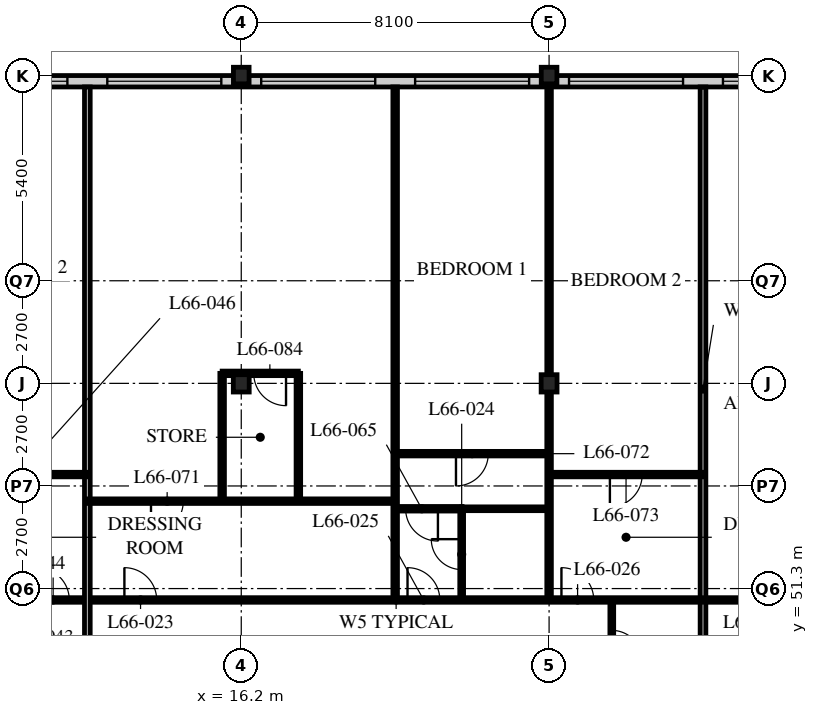
"""IFC4 building model, lengths in metres.
Left out: names, types, materials, properties, quantities, classifications, styles, units other than length and angle.
Written with IfcOpenShell. Run it as: python <this file> out.ifc"""

import sys

from ifc_helpers import new_model, si_unit, direction, frame, frame_2d, origin, origin_2d, place, context, subcontext, project, spatial, rectangle, i_section, extrude, element, fill, save


model = new_model("IFC4")
c1 = context("Model", 3, precision=1e-05, world=origin(), true_north=direction((0.0, 1.0)))
c2 = subcontext(c1, "Body", "Model", "MODEL_VIEW")
j1 = project(units=[si_unit("LENGTHUNIT", "METRE"), si_unit("PLANEANGLEUNIT", "RADIAN")], contexts=[c1])
p1 = place(None, origin())
s1 = spatial("IfcSite", under=j1, at=p1, CompositionType="ELEMENT")
p2 = place(p1, origin())
s2 = spatial("IfcBuilding", under=s1, at=p2, CompositionType="ELEMENT")
p3 = place(p2, frame((0.0, 0.0, 258.0)))
s3 = spatial("IfcBuildingStorey", under=s2, at=p3, CompositionType="ELEMENT", Elevation=258.0)
p4 = place(p3, frame((16.2, 56.7, 0.0), z_axis=(0.0, 0.0, 1.0), x_axis=(1.0, 0.0, 0.0)))
e1 = element("IfcColumn", 1, at=p4, inside=s3, PredefinedType="COLUMN", context=c2, shape_type="SweptSolid", body=[
    extrude(i_section(OverallWidth=0.418, OverallDepth=0.456, WebThickness=0.042, FlangeThickness=0.067, FilletRadius=0.015, at=origin_2d()), origin(), (0.0, 0.0, 1.0), 3.9),
])
p5 = place(p3, frame((16.2, 64.8, 0.0), z_axis=(0.0, 0.0, 1.0), x_axis=(1.0, 0.0, 0.0)))
e2 = element("IfcColumn", 2, at=p5, inside=s3, PredefinedType="COLUMN", context=c2, shape_type="SweptSolid", body=[
    extrude(i_section(OverallWidth=0.412, OverallDepth=0.437, WebThickness=0.036, FlangeThickness=0.058, FilletRadius=0.015, at=origin_2d()), origin(), (0.0, 0.0, 1.0), 3.9),
])
p6 = place(p3, frame((24.3, 56.7, 0.0), z_axis=(0.0, 0.0, 1.0), x_axis=(1.0, 0.0, 0.0)))
e3 = element("IfcColumn", 3, at=p6, inside=s3, PredefinedType="COLUMN", context=c2, shape_type="SweptSolid", body=[
    extrude(i_section(OverallWidth=0.418, OverallDepth=0.456, WebThickness=0.042, FlangeThickness=0.067, FilletRadius=0.015, at=origin_2d()), origin(), (0.0, 0.0, 1.0), 3.9),
])
p7 = place(p3, frame((24.3, 64.8, 0.0), z_axis=(0.0, 0.0, 1.0), x_axis=(1.0, 0.0, 0.0)))
e4 = element("IfcColumn", 4, at=p7, inside=s3, PredefinedType="COLUMN", context=c2, shape_type="SweptSolid", body=[
    extrude(i_section(OverallWidth=0.412, OverallDepth=0.437, WebThickness=0.036, FlangeThickness=0.058, FilletRadius=0.015, at=origin_2d()), origin(), (0.0, 0.0, 1.0), 3.9),
])
p8 = place(p3, frame((48.3, 64.65, 0.0), z_axis=(0.0, 0.0, 1.0), x_axis=(-1.0, 0.0, 0.0)))
e5 = element("IfcWall", 5, at=p8, inside=s3, PredefinedType="SOLIDWALL", context=c2, shape_type="SweptSolid", body=[
    extrude(rectangle(XDim=40.2, YDim=0.3, at=frame_2d((20.1, 0.0))), origin(), (0.0, 0.0, 1.0), 3.69),
])
p9 = place(p8, frame((0.225, 0.0, 0.6)))
e6 = element("IfcOpeningElement", 6, at=p9, cuts=e5, PredefinedType="OPENING", context=c2, shape_type="SweptSolid", body=[
    extrude(rectangle(XDim=3.0, YDim=2.4, at=frame_2d((1.5, 1.2))), frame((0.0, 0.16, 0.0), z_axis=(0.0, -1.0, 0.0), x_axis=(1.0, 0.0, 0.0)), (0.0, 0.0, 1.0), 0.32),
])
p10 = place(p8, frame((4.275, 0.0, 0.6)))
e7 = element("IfcOpeningElement", 7, at=p10, cuts=e5, PredefinedType="OPENING", context=c2, shape_type="SweptSolid", body=[
    extrude(rectangle(XDim=3.0, YDim=2.4, at=frame_2d((1.5, 1.2))), frame((0.0, 0.16, 0.0), z_axis=(0.0, -1.0, 0.0), x_axis=(1.0, 0.0, 0.0)), (0.0, 0.0, 1.0), 0.32),
])
p11 = place(p8, frame((8.325, 0.0, 0.6)))
e8 = element("IfcOpeningElement", 8, at=p11, cuts=e5, PredefinedType="OPENING", context=c2, shape_type="SweptSolid", body=[
    extrude(rectangle(XDim=3.0, YDim=2.4, at=frame_2d((1.5, 1.2))), frame((0.0, 0.16, 0.0), z_axis=(0.0, -1.0, 0.0), x_axis=(1.0, 0.0, 0.0)), (0.0, 0.0, 1.0), 0.32),
])
p12 = place(p8, frame((12.375, 0.0, 0.6)))
e9 = element("IfcOpeningElement", 9, at=p12, cuts=e5, PredefinedType="OPENING", context=c2, shape_type="SweptSolid", body=[
    extrude(rectangle(XDim=3.0, YDim=2.4, at=frame_2d((1.5, 1.2))), frame((0.0, 0.16, 0.0), z_axis=(0.0, -1.0, 0.0), x_axis=(1.0, 0.0, 0.0)), (0.0, 0.0, 1.0), 0.32),
])
p13 = place(p8, frame((16.425, 0.0, 0.6)))
e10 = element("IfcOpeningElement", 10, at=p13, cuts=e5, PredefinedType="OPENING", context=c2, shape_type="SweptSolid", body=[
    extrude(rectangle(XDim=3.0, YDim=2.4, at=frame_2d((1.5, 1.2))), frame((0.0, 0.16, 0.0), z_axis=(0.0, -1.0, 0.0), x_axis=(1.0, 0.0, 0.0)), (0.0, 0.0, 1.0), 0.32),
])
p14 = place(p8, frame((20.475, 0.0, 0.6)))
e11 = element("IfcOpeningElement", 11, at=p14, cuts=e5, PredefinedType="OPENING", context=c2, shape_type="SweptSolid", body=[
    extrude(rectangle(XDim=3.0, YDim=2.4, at=frame_2d((1.5, 1.2))), frame((0.0, 0.16, 0.0), z_axis=(0.0, -1.0, 0.0), x_axis=(1.0, 0.0, 0.0)), (0.0, 0.0, 1.0), 0.32),
])
p15 = place(p8, frame((24.525, 0.0, 0.6)))
e12 = element("IfcOpeningElement", 12, at=p15, cuts=e5, PredefinedType="OPENING", context=c2, shape_type="SweptSolid", body=[
    extrude(rectangle(XDim=3.0, YDim=2.4, at=frame_2d((1.5, 1.2))), frame((0.0, 0.16, 0.0), z_axis=(0.0, -1.0, 0.0), x_axis=(1.0, 0.0, 0.0)), (0.0, 0.0, 1.0), 0.32),
])
p16 = place(p8, frame((28.575, 0.0, 0.6)))
e13 = element("IfcOpeningElement", 13, at=p16, cuts=e5, PredefinedType="OPENING", context=c2, shape_type="SweptSolid", body=[
    extrude(rectangle(XDim=3.0, YDim=2.4, at=frame_2d((1.5, 1.2))), frame((0.0, 0.16, 0.0), z_axis=(0.0, -1.0, 0.0), x_axis=(1.0, 0.0, 0.0)), (0.0, 0.0, 1.0), 0.32),
])
p17 = place(p8, frame((32.625, 0.0, 0.6)))
e14 = element("IfcOpeningElement", 14, at=p17, cuts=e5, PredefinedType="OPENING", context=c2, shape_type="SweptSolid", body=[
    extrude(rectangle(XDim=3.0, YDim=2.4, at=frame_2d((1.5, 1.2))), frame((0.0, 0.16, 0.0), z_axis=(0.0, -1.0, 0.0), x_axis=(1.0, 0.0, 0.0)), (0.0, 0.0, 1.0), 0.32),
])
p18 = place(p8, frame((36.675, 0.0, 0.6)))
e15 = element("IfcOpeningElement", 15, at=p18, cuts=e5, PredefinedType="OPENING", context=c2, shape_type="SweptSolid", body=[
    extrude(rectangle(XDim=3.0, YDim=2.4, at=frame_2d((1.5, 1.2))), frame((0.0, 0.16, 0.0), z_axis=(0.0, -1.0, 0.0), x_axis=(1.0, 0.0, 0.0)), (0.0, 0.0, 1.0), 0.32),
])
p19 = place(p3, frame((25.95, 48.6, 0.0), z_axis=(0.0, 0.0, 1.0), x_axis=(0.0, 1.0, 0.0)))
e16 = element("IfcWall", 16, at=p19, inside=s3, PredefinedType="PARTITIONING", context=c2, shape_type="SweptSolid", body=[
    extrude(rectangle(XDim=2.4, YDim=0.1, at=frame_2d((1.2, 0.0))), origin(), (0.0, 0.0, 1.0), 3.69),
])
p20 = place(p19, frame((0.8, 0.0, 0.0)))
e17 = element("IfcOpeningElement", 17, at=p20, cuts=e16, PredefinedType="OPENING", context=c2, shape_type="SweptSolid", body=[
    extrude(rectangle(XDim=0.8, YDim=2.1, at=frame_2d((0.4, 1.05))), frame((0.0, 0.06, 0.0), z_axis=(0.0, -1.0, 0.0), x_axis=(1.0, 0.0, 0.0)), (0.0, 0.0, 1.0), 0.12),
])
p21 = place(p3, frame((22.0, 51.0, 0.0), z_axis=(0.0, 0.0, 1.0), x_axis=(0.0, 1.0, 0.0)))
e18 = element("IfcWall", 18, at=p21, inside=s3, PredefinedType="PARTITIONING", context=c2, shape_type="SweptSolid", body=[
    extrude(rectangle(XDim=2.4, YDim=0.1, at=frame_2d((1.2, 0.0))), origin(), (0.0, 0.0, 1.0), 3.69),
])
p22 = place(p21, frame((0.8, 0.0, 0.0)))
e19 = element("IfcOpeningElement", 19, at=p22, cuts=e18, PredefinedType="OPENING", context=c2, shape_type="SweptSolid", body=[
    extrude(rectangle(XDim=0.8, YDim=2.1, at=frame_2d((0.4, 1.05))), frame((0.0, 0.06, 0.0), z_axis=(0.0, -1.0, 0.0), x_axis=(1.0, 0.0, 0.0)), (0.0, 0.0, 1.0), 0.12),
])
p23 = place(p3, frame((22.0, 53.4, 0.0), z_axis=(0.0, 0.0, 1.0), x_axis=(1.0, 0.0, 0.0)))
e20 = element("IfcWall", 20, at=p23, inside=s3, PredefinedType="PARTITIONING", context=c2, shape_type="SweptSolid", body=[
    extrude(rectangle(XDim=2.3, YDim=0.1, at=frame_2d((1.15, 0.0))), origin(), (0.0, 0.0, 1.0), 3.69),
])
p24 = place(p3, frame((20.25, 51.0, 0.0), z_axis=(0.0, 0.0, 1.0), x_axis=(0.0, 1.0, 0.0)))
e21 = element("IfcWall", 21, at=p24, inside=s3, PredefinedType="PARTITIONING", context=c2, shape_type="SweptSolid", body=[
    extrude(rectangle(XDim=13.5, YDim=0.12, at=frame_2d((6.75, 0.0))), origin(), (0.0, 0.0, 1.0), 3.69),
])
p25 = place(p3, frame((24.3, 51.0, 0.0), z_axis=(0.0, 0.0, 1.0), x_axis=(0.0, 1.0, 0.0)))
e22 = element("IfcWall", 22, at=p25, inside=s3, PredefinedType="PARTITIONING", context=c2, shape_type="SweptSolid", body=[
    extrude(rectangle(XDim=13.5, YDim=0.12, at=frame_2d((6.75, 0.0))), origin(), (0.0, 0.0, 1.0), 3.078),
])
p26 = place(p3, frame((28.35, 48.6, 0.0), z_axis=(0.0, 0.0, 1.0), x_axis=(0.0, 1.0, 0.0)))
e23 = element("IfcWall", 23, at=p26, inside=s3, PredefinedType="PARTITIONING", context=c2, shape_type="SweptSolid", body=[
    extrude(rectangle(XDim=15.9, YDim=0.15, at=frame_2d((7.95, 0.0))), origin(), (0.0, 0.0, 1.0), 3.69),
])
p27 = place(p3, frame((4.1, 51.0, 0.0), z_axis=(0.0, 0.0, 1.0), x_axis=(1.0, 0.0, 0.0)))
e24 = element("IfcWall", 24, at=p27, inside=s3, PredefinedType="PARTITIONING", context=c2, shape_type="SweptSolid", body=[
    extrude(rectangle(XDim=32.35, YDim=0.12, at=frame_2d((16.175, 0.0))), origin(), (0.0, 0.0, 1.0), 3.69),
])
p28 = place(p27, frame((9.025, 0.0, 0.0)))
e25 = element("IfcOpeningElement", 25, at=p28, cuts=e24, PredefinedType="OPENING", context=c2, shape_type="SweptSolid", body=[
    extrude(rectangle(XDim=0.85, YDim=2.1, at=frame_2d((0.425, 1.05))), frame((0.0, 0.07, 0.0), z_axis=(0.0, -1.0, 0.0), x_axis=(1.0, 0.0, 0.0)), (0.0, 0.0, 1.0), 0.14),
])
p29 = place(p27, frame((16.475, 0.0, 0.0)))
e26 = element("IfcOpeningElement", 26, at=p29, cuts=e24, PredefinedType="OPENING", context=c2, shape_type="SweptSolid", body=[
    extrude(rectangle(XDim=0.85, YDim=2.1, at=frame_2d((0.425, 1.05))), frame((0.0, 0.07, 0.0), z_axis=(0.0, -1.0, 0.0), x_axis=(1.0, 0.0, 0.0)), (0.0, 0.0, 1.0), 0.14),
])
p30 = place(p27, frame((20.525, 0.0, 0.0)))
e27 = element("IfcOpeningElement", 27, at=p30, cuts=e24, PredefinedType="OPENING", context=c2, shape_type="SweptSolid", body=[
    extrude(rectangle(XDim=0.85, YDim=2.1, at=frame_2d((0.425, 1.05))), frame((0.0, 0.07, 0.0), z_axis=(0.0, -1.0, 0.0), x_axis=(1.0, 0.0, 0.0)), (0.0, 0.0, 1.0), 0.14),
])
p31 = place(p27, frame((25.225, 0.0, 0.0)))
e28 = element("IfcOpeningElement", 28, at=p31, cuts=e24, PredefinedType="OPENING", context=c2, shape_type="SweptSolid", body=[
    extrude(rectangle(XDim=0.85, YDim=2.1, at=frame_2d((0.425, 1.05))), frame((0.0, 0.07, 0.0), z_axis=(0.0, -1.0, 0.0), x_axis=(1.0, 0.0, 0.0)), (0.0, 0.0, 1.0), 0.14),
])
p32 = place(p27, frame((28.625, 0.0, 0.0)))
e29 = element("IfcOpeningElement", 29, at=p32, cuts=e24, PredefinedType="OPENING", context=c2, shape_type="SweptSolid", body=[
    extrude(rectangle(XDim=0.85, YDim=2.1, at=frame_2d((0.425, 1.05))), frame((0.0, 0.07, 0.0), z_axis=(0.0, -1.0, 0.0), x_axis=(1.0, 0.0, 0.0)), (0.0, 0.0, 1.0), 0.14),
])
p33 = place(p27, frame((6.725, 0.0, 0.0)))
e30 = element("IfcOpeningElement", 30, at=p33, cuts=e24, PredefinedType="OPENING", context=c2, shape_type="SweptSolid", body=[
    extrude(rectangle(XDim=0.85, YDim=2.1, at=frame_2d((0.425, 1.05))), frame((0.0, 0.07, 0.0), z_axis=(0.0, -1.0, 0.0), x_axis=(1.0, 0.0, 0.0)), (0.0, 0.0, 1.0), 0.14),
])
p34 = place(p27, frame((2.875, 0.0, 0.0)))
e31 = element("IfcOpeningElement", 31, at=p34, cuts=e24, PredefinedType="OPENING", context=c2, shape_type="SweptSolid", body=[
    extrude(rectangle(XDim=0.85, YDim=2.1, at=frame_2d((0.425, 1.05))), frame((0.0, 0.07, 0.0), z_axis=(0.0, -1.0, 0.0), x_axis=(1.0, 0.0, 0.0)), (0.0, 0.0, 1.0), 0.14),
])
p35 = place(p3, frame((12.15, 48.6, 0.0), z_axis=(0.0, 0.0, 1.0), x_axis=(0.0, 1.0, 0.0)))
e32 = element("IfcWall", 32, at=p35, inside=s3, PredefinedType="PARTITIONING", context=c2, shape_type="SweptSolid", body=[
    extrude(rectangle(XDim=15.9, YDim=0.15, at=frame_2d((7.95, 0.0))), origin(), (0.0, 0.0, 1.0), 3.69),
])
p36 = place(p3, frame((20.25, 53.4, 0.0), z_axis=(0.0, 0.0, 1.0), x_axis=(1.0, 0.0, 0.0)))
e33 = element("IfcWall", 33, at=p36, inside=s3, PredefinedType="PARTITIONING", context=c2, shape_type="SweptSolid", body=[
    extrude(rectangle(XDim=1.76, YDim=0.12, at=frame_2d((0.88, 0.0))), origin(), (0.0, 0.0, 1.0), 3.69),
])
p37 = place(p36, frame((0.275, 0.0, 0.0)))
e34 = element("IfcOpeningElement", 34, at=p37, cuts=e33, PredefinedType="OPENING", context=c2, shape_type="SweptSolid", body=[
    extrude(rectangle(XDim=0.85, YDim=2.1, at=frame_2d((0.425, 1.05))), frame((0.0, 0.07, 0.0), z_axis=(0.0, -1.0, 0.0), x_axis=(1.0, 0.0, 0.0)), (0.0, 0.0, 1.0), 0.14),
])
p38 = place(p3, frame((12.15, 53.6, 0.0), z_axis=(0.0, 0.0, 1.0), x_axis=(1.0, 0.0, 0.0)))
e35 = element("IfcWall", 35, at=p38, inside=s3, PredefinedType="PARTITIONING", context=c2, shape_type="SweptSolid", body=[
    extrude(rectangle(XDim=8.1, YDim=0.12, at=frame_2d((4.05, 0.0))), origin(), (0.0, 0.0, 1.0), 3.69),
])
p39 = place(p38, frame((1.675, 0.0, 0.0)))
e36 = element("IfcOpeningElement", 36, at=p39, cuts=e35, PredefinedType="OPENING", context=c2, shape_type="SweptSolid", body=[
    extrude(rectangle(XDim=0.85, YDim=2.1, at=frame_2d((0.425, 1.05))), frame((0.0, 0.07, 0.0), z_axis=(0.0, -1.0, 0.0), x_axis=(1.0, 0.0, 0.0)), (0.0, 0.0, 1.0), 0.14),
])
p40 = place(p3, frame((20.25, 54.85, 0.0), z_axis=(0.0, 0.0, 1.0), x_axis=(1.0, 0.0, 0.0)))
e37 = element("IfcWall", 37, at=p40, inside=s3, PredefinedType="PARTITIONING", context=c2, shape_type="SweptSolid", body=[
    extrude(rectangle(XDim=4.05, YDim=0.12, at=frame_2d((2.025, 0.0))), origin(), (0.0, 0.0, 1.0), 3.69),
])
p41 = place(p40, frame((1.6, 0.0, 0.0)))
e38 = element("IfcOpeningElement", 38, at=p41, cuts=e37, PredefinedType="OPENING", context=c2, shape_type="SweptSolid", body=[
    extrude(rectangle(XDim=0.85, YDim=2.1, at=frame_2d((0.425, 1.05))), frame((0.0, 0.07, 0.0), z_axis=(0.0, -1.0, 0.0), x_axis=(1.0, 0.0, 0.0)), (0.0, 0.0, 1.0), 0.14),
])
p42 = place(p3, frame((24.3, 54.3, 0.0), z_axis=(0.0, 0.0, 1.0), x_axis=(1.0, 0.0, 0.0)))
e39 = element("IfcWall", 39, at=p42, inside=s3, PredefinedType="PARTITIONING", context=c2, shape_type="SweptSolid", body=[
    extrude(rectangle(XDim=4.05, YDim=0.12, at=frame_2d((2.025, 0.0))), origin(), (0.0, 0.0, 1.0), 3.69),
])
p43 = place(p42, frame((1.6, 0.0, 0.0)))
e40 = element("IfcOpeningElement", 40, at=p43, cuts=e39, PredefinedType="OPENING", context=c2, shape_type="SweptSolid", body=[
    extrude(rectangle(XDim=0.85, YDim=2.1, at=frame_2d((0.425, 1.05))), frame((0.0, 0.07, 0.0), z_axis=(0.0, -1.0, 0.0), x_axis=(1.0, 0.0, 0.0)), (0.0, 0.0, 1.0), 0.14),
])
p44 = place(p3, frame((8.1, 54.3, 0.0), z_axis=(0.0, 0.0, 1.0), x_axis=(1.0, 0.0, 0.0)))
e41 = element("IfcWall", 41, at=p44, inside=s3, PredefinedType="PARTITIONING", context=c2, shape_type="SweptSolid", body=[
    extrude(rectangle(XDim=4.05, YDim=0.12, at=frame_2d((2.025, 0.0))), origin(), (0.0, 0.0, 1.0), 3.69),
])
p45 = place(p44, frame((1.6, 0.0, 0.0)))
e42 = element("IfcOpeningElement", 42, at=p45, cuts=e41, PredefinedType="OPENING", context=c2, shape_type="SweptSolid", body=[
    extrude(rectangle(XDim=0.85, YDim=2.1, at=frame_2d((0.425, 1.05))), frame((0.0, 0.07, 0.0), z_axis=(0.0, -1.0, 0.0), x_axis=(1.0, 0.0, 0.0)), (0.0, 0.0, 1.0), 0.14),
])
for number, where, z_axis, x_axis in (
    (43, (15.697, 53.6, 0.0), (0.0, 0.0, 1.0), (0.0, 1.0, 0.0)),
    (44, (17.703, 53.6, 0.0), (0.0, 0.0, 1.0), (0.0, 1.0, 0.0)),
):
    element("IfcWall", number, at=place(p3, frame(where, z_axis=z_axis, x_axis=x_axis)), inside=s3, PredefinedType="PARTITIONING", context=c2, shape_type="SweptSolid", body=[
        extrude(rectangle(XDim=3.363, YDim=0.12, at=frame_2d((1.681, 0.0))), origin(), (0.0, 0.0, 1.0), 3.69),
    ])
p46 = place(p3, frame((15.697, 56.963, 0.0), z_axis=(0.0, 0.0, 1.0), x_axis=(1.0, 0.0, 0.0)))
e45 = element("IfcWall", 45, at=p46, inside=s3, PredefinedType="PARTITIONING", context=c2, shape_type="SweptSolid", body=[
    extrude(rectangle(XDim=2.006, YDim=0.12, at=frame_2d((1.003, 0.0))), origin(), (0.0, 0.0, 1.0), 3.69),
])
p47 = place(p46, frame((0.831, 0.0, 0.0)))
e46 = element("IfcOpeningElement", 46, at=p47, cuts=e45, PredefinedType="OPENING", context=c2, shape_type="SweptSolid", body=[
    extrude(rectangle(XDim=0.85, YDim=2.1, at=frame_2d((0.425, 1.05))), frame((0.0, 0.07, 0.0), z_axis=(0.0, -1.0, 0.0), x_axis=(1.0, 0.0, 0.0)), (0.0, 0.0, 1.0), 0.14),
])
p48 = place(p13, origin())
e47 = element("IfcWindow", 47, at=p48, inside=s3, PartitioningType="SINGLE_PANEL", PredefinedType="WINDOW", context=c2, shape_type="SweptSolid", body=[
    extrude(rectangle(XDim=3.0, YDim=2.4, at=frame_2d((1.5, 1.2))), frame((0.0, 0.03, 0.0), z_axis=(0.0, -1.0, 0.0), x_axis=(1.0, 0.0, 0.0)), (0.0, 0.0, 1.0), 0.06),
])
fill(e10, e47)
p49 = place(p14, origin())
e48 = element("IfcWindow", 48, at=p49, inside=s3, PartitioningType="SINGLE_PANEL", PredefinedType="WINDOW", context=c2, shape_type="SweptSolid", body=[
    extrude(rectangle(XDim=3.0, YDim=2.4, at=frame_2d((1.5, 1.2))), frame((0.0, 0.03, 0.0), z_axis=(0.0, -1.0, 0.0), x_axis=(1.0, 0.0, 0.0)), (0.0, 0.0, 1.0), 0.06),
])
fill(e11, e48)
p50 = place(p15, origin())
e49 = element("IfcWindow", 49, at=p50, inside=s3, PartitioningType="SINGLE_PANEL", PredefinedType="WINDOW", context=c2, shape_type="SweptSolid", body=[
    extrude(rectangle(XDim=3.0, YDim=2.4, at=frame_2d((1.5, 1.2))), frame((0.0, 0.03, 0.0), z_axis=(0.0, -1.0, 0.0), x_axis=(1.0, 0.0, 0.0)), (0.0, 0.0, 1.0), 0.06),
])
fill(e12, e49)
p51 = place(p16, origin())
e50 = element("IfcWindow", 50, at=p51, inside=s3, PartitioningType="SINGLE_PANEL", PredefinedType="WINDOW", context=c2, shape_type="SweptSolid", body=[
    extrude(rectangle(XDim=3.0, YDim=2.4, at=frame_2d((1.5, 1.2))), frame((0.0, 0.03, 0.0), z_axis=(0.0, -1.0, 0.0), x_axis=(1.0, 0.0, 0.0)), (0.0, 0.0, 1.0), 0.06),
])
fill(e13, e50)
p52 = place(p17, origin())
e51 = element("IfcWindow", 51, at=p52, inside=s3, PartitioningType="SINGLE_PANEL", PredefinedType="WINDOW", context=c2, shape_type="SweptSolid", body=[
    extrude(rectangle(XDim=3.0, YDim=2.4, at=frame_2d((1.5, 1.2))), frame((0.0, 0.03, 0.0), z_axis=(0.0, -1.0, 0.0), x_axis=(1.0, 0.0, 0.0)), (0.0, 0.0, 1.0), 0.06),
])
fill(e14, e51)
p53 = place(p18, origin())
e52 = element("IfcWindow", 52, at=p53, inside=s3, PartitioningType="SINGLE_PANEL", PredefinedType="WINDOW", context=c2, shape_type="SweptSolid", body=[
    extrude(rectangle(XDim=3.0, YDim=2.4, at=frame_2d((1.5, 1.2))), frame((0.0, 0.03, 0.0), z_axis=(0.0, -1.0, 0.0), x_axis=(1.0, 0.0, 0.0)), (0.0, 0.0, 1.0), 0.06),
])
fill(e15, e52)
p54 = place(p20, origin())
e53 = element("IfcDoor", 53, at=p54, inside=s3, OperationType="SINGLE_SWING_RIGHT", PredefinedType="DOOR", context=c2, shape_type="SweptSolid", body=[
    extrude(rectangle(XDim=0.8, YDim=2.1, at=frame_2d((0.4, 1.05))), frame((0.0, 0.025, 0.0), z_axis=(0.0, -1.0, 0.0), x_axis=(1.0, 0.0, 0.0)), (0.0, 0.0, 1.0), 0.05),
])
fill(e17, e53)
p55 = place(p28, origin())
e54 = element("IfcDoor", 54, at=p55, inside=s3, OperationType="SINGLE_SWING_LEFT", PredefinedType="DOOR", context=c2, shape_type="SweptSolid", body=[
    extrude(rectangle(XDim=0.85, YDim=2.1, at=frame_2d((0.425, 1.05))), frame((0.0, 0.025, 0.0), z_axis=(0.0, -1.0, 0.0), x_axis=(1.0, 0.0, 0.0)), (0.0, 0.0, 1.0), 0.05),
])
fill(e25, e54)
p56 = place(p22, origin())
e55 = element("IfcDoor", 55, at=p56, inside=s3, OperationType="SINGLE_SWING_RIGHT", PredefinedType="DOOR", context=c2, shape_type="SweptSolid", body=[
    extrude(rectangle(XDim=0.8, YDim=2.1, at=frame_2d((0.4, 1.05))), frame((0.0, 0.025, 0.0), z_axis=(0.0, -1.0, 0.0), x_axis=(1.0, 0.0, 0.0)), (0.0, 0.0, 1.0), 0.05),
])
fill(e19, e55)
p57 = place(p29, origin())
e56 = element("IfcDoor", 56, at=p57, inside=s3, OperationType="SINGLE_SWING_LEFT", PredefinedType="DOOR", context=c2, shape_type="SweptSolid", body=[
    extrude(rectangle(XDim=0.85, YDim=2.1, at=frame_2d((0.425, 1.05))), frame((0.0, 0.025, 0.0), z_axis=(0.0, -1.0, 0.0), x_axis=(1.0, 0.0, 0.0)), (0.0, 0.0, 1.0), 0.05),
])
fill(e26, e56)
p58 = place(p30, origin())
e57 = element("IfcDoor", 57, at=p58, inside=s3, OperationType="SINGLE_SWING_LEFT", PredefinedType="DOOR", context=c2, shape_type="SweptSolid", body=[
    extrude(rectangle(XDim=0.85, YDim=2.1, at=frame_2d((0.425, 1.05))), frame((0.0, 0.025, 0.0), z_axis=(0.0, -1.0, 0.0), x_axis=(1.0, 0.0, 0.0)), (0.0, 0.0, 1.0), 0.05),
])
fill(e27, e57)
p59 = place(p33, origin())
e58 = element("IfcDoor", 58, at=p59, inside=s3, OperationType="SINGLE_SWING_LEFT", PredefinedType="DOOR", context=c2, shape_type="SweptSolid", body=[
    extrude(rectangle(XDim=0.85, YDim=2.1, at=frame_2d((0.425, 1.05))), frame((0.0, 0.025, 0.0), z_axis=(0.0, -1.0, 0.0), x_axis=(1.0, 0.0, 0.0)), (0.0, 0.0, 1.0), 0.05),
])
fill(e30, e58)
p60 = place(p37, origin())
e59 = element("IfcDoor", 59, at=p60, inside=s3, OperationType="SINGLE_SWING_LEFT", PredefinedType="DOOR", context=c2, shape_type="SweptSolid", body=[
    extrude(rectangle(XDim=0.85, YDim=2.1, at=frame_2d((0.425, 1.05))), frame((0.0, 0.025, 0.0), z_axis=(0.0, -1.0, 0.0), x_axis=(1.0, 0.0, 0.0)), (0.0, 0.0, 1.0), 0.05),
])
fill(e34, e59)
p61 = place(p39, origin())
e60 = element("IfcDoor", 60, at=p61, inside=s3, OperationType="SINGLE_SWING_RIGHT", PredefinedType="DOOR", context=c2, shape_type="SweptSolid", body=[
    extrude(rectangle(XDim=0.85, YDim=2.1, at=frame_2d((0.425, 1.05))), frame((0.0, 0.025, 0.0), z_axis=(0.0, -1.0, 0.0), x_axis=(1.0, 0.0, 0.0)), (0.0, 0.0, 1.0), 0.05),
])
fill(e36, e60)
p62 = place(p41, origin())
e61 = element("IfcDoor", 61, at=p62, inside=s3, OperationType="SINGLE_SWING_RIGHT", PredefinedType="DOOR", context=c2, shape_type="SweptSolid", body=[
    extrude(rectangle(XDim=0.85, YDim=2.1, at=frame_2d((0.425, 1.05))), frame((0.0, 0.025, 0.0), z_axis=(0.0, -1.0, 0.0), x_axis=(1.0, 0.0, 0.0)), (0.0, 0.0, 1.0), 0.05),
])
fill(e38, e61)
p63 = place(p43, origin())
e62 = element("IfcDoor", 62, at=p63, inside=s3, OperationType="SINGLE_SWING_RIGHT", PredefinedType="DOOR", context=c2, shape_type="SweptSolid", body=[
    extrude(rectangle(XDim=0.85, YDim=2.1, at=frame_2d((0.425, 1.05))), frame((0.0, 0.025, 0.0), z_axis=(0.0, -1.0, 0.0), x_axis=(1.0, 0.0, 0.0)), (0.0, 0.0, 1.0), 0.05),
])
fill(e40, e62)
p64 = place(p47, origin())
e63 = element("IfcDoor", 63, at=p64, inside=s3, OperationType="SINGLE_SWING_LEFT", PredefinedType="DOOR", context=c2, shape_type="SweptSolid", body=[
    extrude(rectangle(XDim=0.85, YDim=2.1, at=frame_2d((0.425, 1.05))), frame((0.0, 0.025, 0.0), z_axis=(0.0, -1.0, 0.0), x_axis=(1.0, 0.0, 0.0)), (0.0, 0.0, 1.0), 0.05),
])
fill(e46, e63)
save(model, sys.argv[1])
